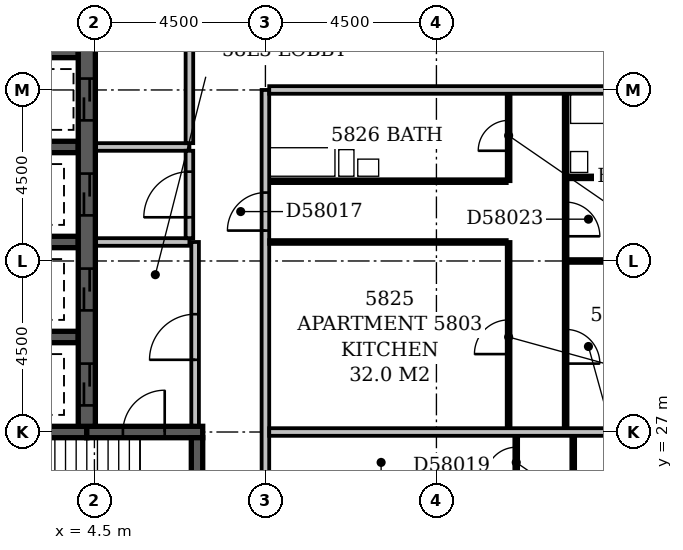
"""IFC4 building model, lengths in metres.
Left out: names, types, materials, properties, quantities, classifications, styles, units other than length and angle.
Written with IfcOpenShell. Run it as: python <this file> out.ifc"""

import sys

from ifc_helpers import new_model, si_unit, direction, frame, frame_2d, origin, place, context, subcontext, project, spatial, rectangle, extrude, element, fill, save


model = new_model("IFC4")
c1 = context("Model", 3, precision=1e-05, world=origin(), true_north=direction((0.0, 1.0)))
c2 = subcontext(c1, "Body", "Model", "MODEL_VIEW")
j1 = project(units=[si_unit("LENGTHUNIT", "METRE"), si_unit("PLANEANGLEUNIT", "RADIAN")], contexts=[c1])
p1 = place(None, origin())
s1 = spatial("IfcSite", under=j1, at=p1, CompositionType="ELEMENT")
p2 = place(p1, origin())
s2 = spatial("IfcBuilding", under=s1, at=p2, CompositionType="ELEMENT")
p3 = place(p2, frame((0.0, 0.0, 225.8)))
s3 = spatial("IfcBuildingStorey", under=s2, at=p3, CompositionType="ELEMENT", Elevation=225.8)
p4 = place(p3, frame((0.35, 27.0, -0.3), z_axis=(0.0, 0.0, 1.0), x_axis=(1.0, 0.0, 0.0)))
e1 = element("IfcWall", 1, at=p4, inside=s3, PredefinedType="SHEAR", context=c2, shape_type="SweptSolid", body=[
    extrude(rectangle(XDim=3.95, YDim=0.3, at=frame_2d((1.975, 0.0))), origin(), (0.0, 0.0, 1.0), 3.6),
])
for number, where, z_axis, x_axis in (
    (2, (0.725, 29.5, -0.3), (0.0, 0.0, 1.0), (1.0, 0.0, 0.0)),
    (3, (0.725, 32.0, -0.3), (0.0, 0.0, 1.0), (1.0, 0.0, 0.0)),
    (4, (0.725, 34.5, -0.3), (0.0, 0.0, 1.0), (1.0, 0.0, 0.0)),
    (5, (0.725, 37.0, -0.3), (0.0, 0.0, 1.0), (1.0, 0.0, 0.0)),
):
    element("IfcWall", number, at=place(p3, frame(where, z_axis=z_axis, x_axis=x_axis)), inside=s3, PredefinedType="SHEAR", context=c2, shape_type="SweptSolid", body=[
        extrude(rectangle(XDim=3.35, YDim=0.3, at=frame_2d((1.675, 0.0))), origin(), (0.0, 0.0, 1.0), 3.6),
    ])
p5 = place(p3, frame((4.3, 27.0, -0.3), z_axis=(0.0, 0.0, 1.0), x_axis=(1.0, 0.0, 0.0)))
e6 = element("IfcWall", 6, at=p5, inside=s3, PredefinedType="SHEAR", context=c2, shape_type="SweptSolid", body=[
    extrude(rectangle(XDim=3.05, YDim=0.3, at=frame_2d((1.525, 0.0))), origin(), (0.0, 0.0, 1.0), 3.6),
])
p6 = place(p5, frame((0.95, 0.0, 0.3)))
e7 = element("IfcOpeningElement", 7, at=p6, cuts=e6, PredefinedType="OPENING", context=c2, shape_type="SweptSolid", body=[
    extrude(rectangle(XDim=1.1, YDim=2.1, at=frame_2d((0.55, 1.05))), frame((0.0, 0.162, 0.0), z_axis=(0.0, -1.0, 0.0), x_axis=(1.0, 0.0, 0.0)), (0.0, 0.0, 1.0), 0.324),
])
p7 = place(p3, frame((4.3, 27.15, -0.3), z_axis=(0.0, 0.0, 1.0), x_axis=(0.0, 1.0, 0.0)))
e8 = element("IfcWall", 8, at=p7, inside=s3, PredefinedType="SHEAR", context=c2, shape_type="SweptSolid", body=[
    extrude(rectangle(XDim=22.125, YDim=0.45, at=frame_2d((11.062, 0.0))), origin(), (0.0, 0.0, 1.0), 3.6),
])
p8 = place(p7, frame((3.05, 0.0, 0.3)))
e9 = element("IfcOpeningElement", 9, at=p8, cuts=e8, PredefinedType="OPENING", context=c2, shape_type="SweptSolid", body=[
    extrude(rectangle(XDim=1.1, YDim=2.1, at=frame_2d((0.55, 1.05))), frame((0.0, 0.237, 0.0), z_axis=(0.0, -1.0, 0.0), x_axis=(1.0, 0.0, 0.0)), (0.0, 0.0, 1.0), 0.474),
])
p9 = place(p7, frame((0.55, 0.0, 0.3)))
e10 = element("IfcOpeningElement", 10, at=p9, cuts=e8, PredefinedType="OPENING", context=c2, shape_type="SweptSolid", body=[
    extrude(rectangle(XDim=1.1, YDim=2.1, at=frame_2d((0.55, 1.05))), frame((0.0, 0.237, 0.0), z_axis=(0.0, -1.0, 0.0), x_axis=(1.0, 0.0, 0.0)), (0.0, 0.0, 1.0), 0.474),
])
p10 = place(p7, frame((20.55, 0.0, 0.3)))
e11 = element("IfcOpeningElement", 11, at=p10, cuts=e8, PredefinedType="OPENING", context=c2, shape_type="SweptSolid", body=[
    extrude(rectangle(XDim=1.1, YDim=2.1, at=frame_2d((0.55, 1.05))), frame((0.0, 0.237, 0.0), z_axis=(0.0, -1.0, 0.0), x_axis=(1.0, 0.0, 0.0)), (0.0, 0.0, 1.0), 0.474),
])
p11 = place(p7, frame((18.05, 0.0, 0.3)))
e12 = element("IfcOpeningElement", 12, at=p11, cuts=e8, PredefinedType="OPENING", context=c2, shape_type="SweptSolid", body=[
    extrude(rectangle(XDim=1.1, YDim=2.1, at=frame_2d((0.55, 1.05))), frame((0.0, 0.237, 0.0), z_axis=(0.0, -1.0, 0.0), x_axis=(1.0, 0.0, 0.0)), (0.0, 0.0, 1.0), 0.474),
])
p12 = place(p7, frame((15.55, 0.0, 0.3)))
e13 = element("IfcOpeningElement", 13, at=p12, cuts=e8, PredefinedType="OPENING", context=c2, shape_type="SweptSolid", body=[
    extrude(rectangle(XDim=1.1, YDim=2.1, at=frame_2d((0.55, 1.05))), frame((0.0, 0.237, 0.0), z_axis=(0.0, -1.0, 0.0), x_axis=(1.0, 0.0, 0.0)), (0.0, 0.0, 1.0), 0.474),
])
p13 = place(p7, frame((13.05, 0.0, 0.3)))
e14 = element("IfcOpeningElement", 14, at=p13, cuts=e8, PredefinedType="OPENING", context=c2, shape_type="SweptSolid", body=[
    extrude(rectangle(XDim=1.1, YDim=2.1, at=frame_2d((0.55, 1.05))), frame((0.0, 0.237, 0.0), z_axis=(0.0, -1.0, 0.0), x_axis=(1.0, 0.0, 0.0)), (0.0, 0.0, 1.0), 0.474),
])
p14 = place(p7, frame((10.55, 0.0, 0.3)))
e15 = element("IfcOpeningElement", 15, at=p14, cuts=e8, PredefinedType="OPENING", context=c2, shape_type="SweptSolid", body=[
    extrude(rectangle(XDim=1.1, YDim=2.1, at=frame_2d((0.55, 1.05))), frame((0.0, 0.237, 0.0), z_axis=(0.0, -1.0, 0.0), x_axis=(1.0, 0.0, 0.0)), (0.0, 0.0, 1.0), 0.474),
])
p15 = place(p7, frame((8.05, 0.0, 0.3)))
e16 = element("IfcOpeningElement", 16, at=p15, cuts=e8, PredefinedType="OPENING", context=c2, shape_type="SweptSolid", body=[
    extrude(rectangle(XDim=1.1, YDim=2.1, at=frame_2d((0.55, 1.05))), frame((0.0, 0.237, 0.0), z_axis=(0.0, -1.0, 0.0), x_axis=(1.0, 0.0, 0.0)), (0.0, 0.0, 1.0), 0.474),
])
p16 = place(p7, frame((5.55, 0.0, 0.3)))
e17 = element("IfcOpeningElement", 17, at=p16, cuts=e8, PredefinedType="OPENING", context=c2, shape_type="SweptSolid", body=[
    extrude(rectangle(XDim=1.1, YDim=2.1, at=frame_2d((0.55, 1.05))), frame((0.0, 0.237, 0.0), z_axis=(0.0, -1.0, 0.0), x_axis=(1.0, 0.0, 0.0)), (0.0, 0.0, 1.0), 0.474),
])
p17 = place(p3, frame((7.2, 22.65, -0.3), z_axis=(0.0, 0.0, 1.0), x_axis=(0.0, 1.0, 0.0)))
e18 = element("IfcWall", 18, at=p17, inside=s3, PredefinedType="SHEAR", context=c2, shape_type="SweptSolid", body=[
    extrude(rectangle(XDim=4.2, YDim=0.3, at=frame_2d((2.1, 0.0))), origin(), (0.0, 0.0, 1.0), 3.6),
])
p18 = place(p17, frame((0.8, 0.0, 0.3)))
e19 = element("IfcOpeningElement", 19, at=p18, cuts=e18, PredefinedType="OPENING", context=c2, shape_type="SweptSolid", body=[
    extrude(rectangle(XDim=1.1, YDim=2.1, at=frame_2d((0.55, 1.05))), frame((0.0, 0.162, 0.0), z_axis=(0.0, -1.0, 0.0), x_axis=(1.0, 0.0, 0.0)), (0.0, 0.0, 1.0), 0.324),
])
p19 = place(p3, frame((4.545, 34.5, 0.0), z_axis=(0.0, 0.0, 1.0), x_axis=(1.0, 0.0, 0.0)))
e20 = element("IfcWall", 20, at=p19, inside=s3, PredefinedType="PARTITIONING", context=c2, shape_type="SweptSolid", body=[
    extrude(rectangle(XDim=2.455, YDim=0.2, at=frame_2d((1.228, 0.0))), origin(), (0.0, 0.0, 1.0), 3.3),
])
p20 = place(p3, frame((7.0, 34.6, 0.0), z_axis=(0.0, 0.0, 1.0), x_axis=(0.0, 1.0, 0.0)))
e21 = element("IfcWall", 21, at=p20, inside=s3, PredefinedType="PARTITIONING", context=c2, shape_type="SweptSolid", body=[
    extrude(rectangle(XDim=14.9, YDim=0.2, at=frame_2d((7.45, 0.0))), origin(), (0.0, 0.0, 1.0), 3.3),
])
p21 = place(p20, frame((2.8, 0.0, 0.0)))
e22 = element("IfcOpeningElement", 22, at=p21, cuts=e21, PredefinedType="OPENING", context=c2, shape_type="SweptSolid", body=[
    extrude(rectangle(XDim=1.2, YDim=2.1, at=frame_2d((0.6, 1.05))), frame((0.0, 0.112, 0.0), z_axis=(0.0, -1.0, 0.0), x_axis=(1.0, 0.0, 0.0)), (0.0, 0.0, 1.0), 0.224),
])
p22 = place(p20, frame((9.8, 0.0, 0.0)))
e23 = element("IfcOpeningElement", 23, at=p22, cuts=e21, PredefinedType="OPENING", context=c2, shape_type="SweptSolid", body=[
    extrude(rectangle(XDim=1.2, YDim=2.1, at=frame_2d((0.6, 1.05))), frame((0.0, 0.112, 0.0), z_axis=(0.0, -1.0, 0.0), x_axis=(1.0, 0.0, 0.0)), (0.0, 0.0, 1.0), 0.224),
])
p23 = place(p3, frame((4.545, 32.0, 0.0), z_axis=(0.0, 0.0, 1.0), x_axis=(1.0, 0.0, 0.0)))
e24 = element("IfcWall", 24, at=p23, inside=s3, PredefinedType="PARTITIONING", context=c2, shape_type="SweptSolid", body=[
    extrude(rectangle(XDim=2.455, YDim=0.2, at=frame_2d((1.228, 0.0))), origin(), (0.0, 0.0, 1.0), 3.3),
])
p24 = place(p3, frame((7.0, 32.1, 0.0), z_axis=(0.0, 0.0, 1.0), x_axis=(0.0, 1.0, 0.0)))
e25 = element("IfcWall", 25, at=p24, inside=s3, PredefinedType="PARTITIONING", context=c2, shape_type="SweptSolid", body=[
    extrude(rectangle(XDim=2.3, YDim=0.2, at=frame_2d((1.15, 0.0))), origin(), (0.0, 0.0, 1.0), 3.3),
])
p25 = place(p24, frame((0.55, 0.0, 0.0)))
e26 = element("IfcOpeningElement", 26, at=p25, cuts=e25, PredefinedType="OPENING", context=c2, shape_type="SweptSolid", body=[
    extrude(rectangle(XDim=1.2, YDim=2.1, at=frame_2d((0.6, 1.05))), frame((0.0, 0.112, 0.0), z_axis=(0.0, -1.0, 0.0), x_axis=(1.0, 0.0, 0.0)), (0.0, 0.0, 1.0), 0.224),
])
p26 = place(p3, frame((7.15, 27.17, 0.0), z_axis=(0.0, 0.0, 1.0), x_axis=(0.0, 1.0, 0.0)))
e27 = element("IfcWall", 27, at=p26, inside=s3, PredefinedType="PARTITIONING", context=c2, shape_type="SweptSolid", body=[
    extrude(rectangle(XDim=4.83, YDim=0.2, at=frame_2d((2.415, 0.0))), origin(), (0.0, 0.0, 1.0), 3.3),
])
p27 = place(p26, frame((1.73, 0.0, 0.0)))
e28 = element("IfcOpeningElement", 28, at=p27, cuts=e27, PredefinedType="OPENING", context=c2, shape_type="SweptSolid", body=[
    extrude(rectangle(XDim=1.2, YDim=2.1, at=frame_2d((0.6, 1.05))), frame((0.0, 0.112, 0.0), z_axis=(0.0, -1.0, 0.0), x_axis=(1.0, 0.0, 0.0)), (0.0, 0.0, 1.0), 0.224),
])
p28 = place(p3, frame((17.1, 17.4, 0.0), z_axis=(0.0, 0.0, 1.0), x_axis=(0.0, 1.0, 0.0)))
e29 = element("IfcWall", 29, at=p28, inside=s3, PredefinedType="PARTITIONING", context=c2, shape_type="SweptSolid", body=[
    extrude(rectangle(XDim=9.5, YDim=0.1, at=frame_2d((4.75, 0.0))), origin(), (0.0, 0.0, 1.0), 3.3),
])
p29 = place(p28, frame((2.4, 0.0, 0.0)))
e30 = element("IfcOpeningElement", 30, at=p29, cuts=e29, PredefinedType="OPENING", context=c2, shape_type="SweptSolid", body=[
    extrude(rectangle(XDim=0.9, YDim=2.1, at=frame_2d((0.45, 1.05))), frame((0.0, 0.062, 0.0), z_axis=(0.0, -1.0, 0.0), x_axis=(1.0, 0.0, 0.0)), (0.0, 0.0, 1.0), 0.124),
])
p30 = place(p28, frame((6.9, 0.0, 0.0)))
e31 = element("IfcOpeningElement", 31, at=p30, cuts=e29, PredefinedType="OPENING", context=c2, shape_type="SweptSolid", body=[
    extrude(rectangle(XDim=0.9, YDim=2.1, at=frame_2d((0.45, 1.05))), frame((0.0, 0.062, 0.0), z_axis=(0.0, -1.0, 0.0), x_axis=(1.0, 0.0, 0.0)), (0.0, 0.0, 1.0), 0.124),
])
p31 = place(p3, frame((9.0, 18.45, 0.0), z_axis=(0.0, 0.0, 1.0), x_axis=(0.0, 1.0, 0.0)))
e32 = element("IfcWall", 32, at=p31, inside=s3, PredefinedType="PARTITIONING", context=c2, shape_type="SweptSolid", body=[
    extrude(rectangle(XDim=17.55, YDim=0.2, at=frame_2d((8.775, 0.0))), origin(), (0.0, 0.0, 1.0), 3.3),
])
p32 = place(p31, frame((13.85, 0.0, 0.0)))
e33 = element("IfcOpeningElement", 33, at=p32, cuts=e32, PredefinedType="OPENING", context=c2, shape_type="SweptSolid", body=[
    extrude(rectangle(XDim=1.0, YDim=2.1, at=frame_2d((0.5, 1.05))), frame((0.0, 0.112, 0.0), z_axis=(0.0, -1.0, 0.0), x_axis=(1.0, 0.0, 0.0)), (0.0, 0.0, 1.0), 0.224),
])
p33 = place(p31, frame((3.25, 0.0, 0.0)))
e34 = element("IfcOpeningElement", 34, at=p33, cuts=e32, PredefinedType="OPENING", context=c2, shape_type="SweptSolid", body=[
    extrude(rectangle(XDim=1.0, YDim=2.1, at=frame_2d((0.5, 1.05))), frame((0.0, 0.112, 0.0), z_axis=(0.0, -1.0, 0.0), x_axis=(1.0, 0.0, 0.0)), (0.0, 0.0, 1.0), 0.224),
])
p34 = place(p3, frame((15.6, 23.0, 0.0), z_axis=(0.0, 0.0, 1.0), x_axis=(0.0, 1.0, 0.0)))
e35 = element("IfcWall", 35, at=p34, inside=s3, PredefinedType="PARTITIONING", context=c2, shape_type="SweptSolid", body=[
    extrude(rectangle(XDim=3.9, YDim=0.1, at=frame_2d((1.95, 0.0))), origin(), (0.0, 0.0, 1.0), 3.3),
])
p35 = place(p34, frame((0.8, 0.0, 0.0)))
e36 = element("IfcOpeningElement", 36, at=p35, cuts=e35, PredefinedType="OPENING", context=c2, shape_type="SweptSolid", body=[
    extrude(rectangle(XDim=0.8, YDim=2.1, at=frame_2d((0.4, 1.05))), frame((0.0, 0.062, 0.0), z_axis=(0.0, -1.0, 0.0), x_axis=(1.0, 0.0, 0.0)), (0.0, 0.0, 1.0), 0.124),
])
p36 = place(p34, frame((2.8, 0.0, 0.0)))
e37 = element("IfcOpeningElement", 37, at=p36, cuts=e35, PredefinedType="OPENING", context=c2, shape_type="SweptSolid", body=[
    extrude(rectangle(XDim=0.8, YDim=2.1, at=frame_2d((0.4, 1.05))), frame((0.0, 0.062, 0.0), z_axis=(0.0, -1.0, 0.0), x_axis=(1.0, 0.0, 0.0)), (0.0, 0.0, 1.0), 0.124),
])
p37 = place(p3, frame((9.1, 27.0, 0.0), z_axis=(0.0, 0.0, 1.0), x_axis=(1.0, 0.0, 0.0)))
e38 = element("IfcWall", 38, at=p37, inside=s3, PredefinedType="PARTITIONING", context=c2, shape_type="SweptSolid", body=[
    extrude(rectangle(XDim=12.95, YDim=0.2, at=frame_2d((6.475, 0.0))), origin(), (0.0, 0.0, 1.0), 2.7),
])
p38 = place(p3, frame((15.4, 27.1, 0.0), z_axis=(0.0, 0.0, 1.0), x_axis=(0.0, 1.0, 0.0)))
e39 = element("IfcWall", 39, at=p38, inside=s3, PredefinedType="PARTITIONING", context=c2, shape_type="SweptSolid", body=[
    extrude(rectangle(XDim=4.9, YDim=0.1, at=frame_2d((2.45, 0.0))), origin(), (0.0, 0.0, 1.0), 3.3),
])
p39 = place(p38, frame((1.95, 0.0, 0.0)))
e40 = element("IfcOpeningElement", 40, at=p39, cuts=e39, PredefinedType="OPENING", context=c2, shape_type="SweptSolid", body=[
    extrude(rectangle(XDim=0.9, YDim=2.1, at=frame_2d((0.45, 1.05))), frame((0.0, 0.062, 0.0), z_axis=(0.0, -1.0, 0.0), x_axis=(1.0, 0.0, 0.0)), (0.0, 0.0, 1.0), 0.124),
])
p40 = place(p3, frame((16.9, 27.1, 0.0), z_axis=(0.0, 0.0, 1.0), x_axis=(0.0, 1.0, 0.0)))
e41 = element("IfcWall", 41, at=p40, inside=s3, PredefinedType="PARTITIONING", context=c2, shape_type="SweptSolid", body=[
    extrude(rectangle(XDim=8.8, YDim=0.1, at=frame_2d((4.4, 0.0))), origin(), (0.0, 0.0, 1.0), 3.3),
])
p41 = place(p40, frame((1.7, 0.0, 0.0)))
e42 = element("IfcOpeningElement", 42, at=p41, cuts=e41, PredefinedType="OPENING", context=c2, shape_type="SweptSolid", body=[
    extrude(rectangle(XDim=0.9, YDim=2.1, at=frame_2d((0.45, 1.05))), frame((0.0, 0.062, 0.0), z_axis=(0.0, -1.0, 0.0), x_axis=(1.0, 0.0, 0.0)), (0.0, 0.0, 1.0), 0.124),
])
p42 = place(p40, frame((5.05, 0.0, 0.0)))
e43 = element("IfcOpeningElement", 43, at=p42, cuts=e41, PredefinedType="OPENING", context=c2, shape_type="SweptSolid", body=[
    extrude(rectangle(XDim=0.9, YDim=2.1, at=frame_2d((0.45, 1.05))), frame((0.0, 0.062, 0.0), z_axis=(0.0, -1.0, 0.0), x_axis=(1.0, 0.0, 0.0)), (0.0, 0.0, 1.0), 0.124),
])
p43 = place(p3, frame((16.95, 31.5, 0.0), z_axis=(0.0, 0.0, 1.0), x_axis=(1.0, 0.0, 0.0)))
e44 = element("IfcWall", 44, at=p43, inside=s3, PredefinedType="PARTITIONING", context=c2, shape_type="SweptSolid", body=[
    extrude(rectangle(XDim=5.1, YDim=0.1, at=frame_2d((2.55, 0.0))), origin(), (0.0, 0.0, 1.0), 3.3),
])
p44 = place(p3, frame((9.1, 32.0, 0.0), z_axis=(0.0, 0.0, 1.0), x_axis=(1.0, 0.0, 0.0)))
e45 = element("IfcWall", 45, at=p44, inside=s3, PredefinedType="PARTITIONING", context=c2, shape_type="SweptSolid", body=[
    extrude(rectangle(XDim=6.25, YDim=0.1, at=frame_2d((3.125, 0.0))), origin(), (0.0, 0.0, 1.0), 3.3),
])
p45 = place(p3, frame((9.1, 33.6, 0.0), z_axis=(0.0, 0.0, 1.0), x_axis=(1.0, 0.0, 0.0)))
e46 = element("IfcWall", 46, at=p45, inside=s3, PredefinedType="PLUMBINGWALL", context=c2, shape_type="SweptSolid", body=[
    extrude(rectangle(XDim=6.25, YDim=0.1, at=frame_2d((3.125, 0.0))), origin(), (0.0, 0.0, 1.0), 3.3),
])
p46 = place(p3, frame((15.4, 33.6, 0.0), z_axis=(0.0, 0.0, 1.0), x_axis=(0.0, 1.0, 0.0)))
e47 = element("IfcWall", 47, at=p46, inside=s3, PredefinedType="PARTITIONING", context=c2, shape_type="SweptSolid", body=[
    extrude(rectangle(XDim=2.3, YDim=0.1, at=frame_2d((1.15, 0.0))), origin(), (0.0, 0.0, 1.0), 3.3),
])
p47 = place(p46, frame((0.8, 0.0, 0.0)))
e48 = element("IfcOpeningElement", 48, at=p47, cuts=e47, PredefinedType="OPENING", context=c2, shape_type="SweptSolid", body=[
    extrude(rectangle(XDim=0.8, YDim=2.1, at=frame_2d((0.4, 1.05))), frame((0.0, 0.062, 0.0), z_axis=(0.0, -1.0, 0.0), x_axis=(1.0, 0.0, 0.0)), (0.0, 0.0, 1.0), 0.124),
])
p48 = place(p3, frame((16.95, 33.7, 0.0), z_axis=(0.0, 0.0, 1.0), x_axis=(1.0, 0.0, 0.0)))
e49 = element("IfcWall", 49, at=p48, inside=s3, PredefinedType="PLUMBINGWALL", context=c2, shape_type="SweptSolid", body=[
    extrude(rectangle(XDim=2.8, YDim=0.1, at=frame_2d((1.4, 0.0))), origin(), (0.0, 0.0, 1.0), 3.3),
])
p49 = place(p48, frame((1.0, 0.0, 0.0)))
e50 = element("IfcOpeningElement", 50, at=p49, cuts=e49, PredefinedType="OPENING", context=c2, shape_type="SweptSolid", body=[
    extrude(rectangle(XDim=0.8, YDim=2.1, at=frame_2d((0.4, 1.05))), frame((0.0, 0.062, 0.0), z_axis=(0.0, -1.0, 0.0), x_axis=(1.0, 0.0, 0.0)), (0.0, 0.0, 1.0), 0.124),
])
p50 = place(p3, frame((9.1, 36.0, 0.0), z_axis=(0.0, 0.0, 1.0), x_axis=(1.0, 0.0, 0.0)))
e51 = element("IfcWall", 51, at=p50, inside=s3, PredefinedType="PARTITIONING", context=c2, shape_type="SweptSolid", body=[
    extrude(rectangle(XDim=12.95, YDim=0.2, at=frame_2d((6.475, 0.0))), origin(), (0.0, 0.0, 1.0), 3.3),
])
p51 = place(p27, origin())
e52 = element("IfcDoor", 52, at=p51, inside=s3, OperationType="SINGLE_SWING_LEFT", PredefinedType="DOOR", context=c2, shape_type="SweptSolid", body=[
    extrude(rectangle(XDim=1.2, YDim=2.1, at=frame_2d((0.6, 1.05))), frame((0.0, 0.025, 0.0), z_axis=(0.0, -1.0, 0.0), x_axis=(1.0, 0.0, 0.0)), (0.0, 0.0, 1.0), 0.05),
])
fill(e28, e52)
p52 = place(p8, origin())
e53 = element("IfcDoor", 53, at=p52, inside=s3, OperationType="SLIDING_TO_LEFT", PredefinedType="DOOR", context=c2, shape_type="SweptSolid", body=[
    extrude(rectangle(XDim=1.1, YDim=2.1, at=frame_2d((0.55, 1.05))), frame((0.0, 0.025, 0.0), z_axis=(0.0, -1.0, 0.0), x_axis=(1.0, 0.0, 0.0)), (0.0, 0.0, 1.0), 0.05),
])
fill(e9, e53)
p53 = place(p9, origin())
e54 = element("IfcDoor", 54, at=p53, inside=s3, OperationType="SLIDING_TO_LEFT", PredefinedType="DOOR", context=c2, shape_type="SweptSolid", body=[
    extrude(rectangle(XDim=1.1, YDim=2.1, at=frame_2d((0.55, 1.05))), frame((0.0, 0.025, 0.0), z_axis=(0.0, -1.0, 0.0), x_axis=(1.0, 0.0, 0.0)), (0.0, 0.0, 1.0), 0.05),
])
fill(e10, e54)
p54 = place(p15, origin())
e55 = element("IfcDoor", 55, at=p54, inside=s3, OperationType="SLIDING_TO_LEFT", PredefinedType="DOOR", context=c2, shape_type="SweptSolid", body=[
    extrude(rectangle(XDim=1.1, YDim=2.1, at=frame_2d((0.55, 1.05))), frame((0.0, 0.025, 0.0), z_axis=(0.0, -1.0, 0.0), x_axis=(1.0, 0.0, 0.0)), (0.0, 0.0, 1.0), 0.05),
])
fill(e16, e55)
p55 = place(p25, origin())
e56 = element("IfcDoor", 56, at=p55, inside=s3, OperationType="SINGLE_SWING_LEFT", PredefinedType="DOOR", context=c2, shape_type="SweptSolid", body=[
    extrude(rectangle(XDim=1.2, YDim=2.1, at=frame_2d((0.6, 1.05))), frame((0.0, 0.025, 0.0), z_axis=(0.0, -1.0, 0.0), x_axis=(1.0, 0.0, 0.0)), (0.0, 0.0, 1.0), 0.05),
])
fill(e26, e56)
p56 = place(p16, origin())
e57 = element("IfcDoor", 57, at=p56, inside=s3, OperationType="SLIDING_TO_LEFT", PredefinedType="DOOR", context=c2, shape_type="SweptSolid", body=[
    extrude(rectangle(XDim=1.1, YDim=2.1, at=frame_2d((0.55, 1.05))), frame((0.0, 0.025, 0.0), z_axis=(0.0, -1.0, 0.0), x_axis=(1.0, 0.0, 0.0)), (0.0, 0.0, 1.0), 0.05),
])
fill(e17, e57)
p57 = place(p6, frame((1.1, 0.0, 0.0), z_axis=(0.0, 0.0, 1.0), x_axis=(-1.0, 0.0, 0.0)))
e58 = element("IfcDoor", 58, at=p57, inside=s3, OperationType="SINGLE_SWING_LEFT", PredefinedType="DOOR", context=c2, shape_type="SweptSolid", body=[
    extrude(rectangle(XDim=1.1, YDim=2.1, at=frame_2d((0.55, 1.05))), frame((0.0, 0.025, 0.0), z_axis=(0.0, -1.0, 0.0), x_axis=(1.0, 0.0, 0.0)), (0.0, 0.0, 1.0), 0.05),
])
fill(e7, e58)
p58 = place(p32, origin())
e59 = element("IfcDoor", 59, at=p58, inside=s3, OperationType="SINGLE_SWING_LEFT", PredefinedType="DOOR", context=c2, shape_type="SweptSolid", body=[
    extrude(rectangle(XDim=1.0, YDim=2.1, at=frame_2d((0.5, 1.05))), frame((0.0, 0.025, 0.0), z_axis=(0.0, -1.0, 0.0), x_axis=(1.0, 0.0, 0.0)), (0.0, 0.0, 1.0), 0.05),
])
fill(e33, e59)
p59 = place(p36, origin())
e60 = element("IfcDoor", 60, at=p59, inside=s3, OperationType="SINGLE_SWING_LEFT", PredefinedType="DOOR", context=c2, shape_type="SweptSolid", body=[
    extrude(rectangle(XDim=0.8, YDim=2.1, at=frame_2d((0.4, 1.05))), frame((0.0, 0.025, 0.0), z_axis=(0.0, -1.0, 0.0), x_axis=(1.0, 0.0, 0.0)), (0.0, 0.0, 1.0), 0.05),
])
fill(e37, e60)
p60 = place(p39, origin())
e61 = element("IfcDoor", 61, at=p60, inside=s3, OperationType="SINGLE_SWING_LEFT", PredefinedType="DOOR", context=c2, shape_type="SweptSolid", body=[
    extrude(rectangle(XDim=0.9, YDim=2.1, at=frame_2d((0.45, 1.05))), frame((0.0, 0.025, 0.0), z_axis=(0.0, -1.0, 0.0), x_axis=(1.0, 0.0, 0.0)), (0.0, 0.0, 1.0), 0.05),
])
fill(e40, e61)
p61 = place(p41, frame((0.9, 0.0, 0.0), z_axis=(0.0, 0.0, 1.0), x_axis=(-1.0, 0.0, 0.0)))
e62 = element("IfcDoor", 62, at=p61, inside=s3, OperationType="SINGLE_SWING_RIGHT", PredefinedType="DOOR", context=c2, shape_type="SweptSolid", body=[
    extrude(rectangle(XDim=0.9, YDim=2.1, at=frame_2d((0.45, 1.05))), frame((0.0, 0.025, 0.0), z_axis=(0.0, -1.0, 0.0), x_axis=(1.0, 0.0, 0.0)), (0.0, 0.0, 1.0), 0.05),
])
fill(e42, e62)
p62 = place(p42, frame((0.9, 0.0, 0.0), z_axis=(0.0, 0.0, 1.0), x_axis=(-1.0, 0.0, 0.0)))
e63 = element("IfcDoor", 63, at=p62, inside=s3, OperationType="SINGLE_SWING_RIGHT", PredefinedType="DOOR", context=c2, shape_type="SweptSolid", body=[
    extrude(rectangle(XDim=0.9, YDim=2.1, at=frame_2d((0.45, 1.05))), frame((0.0, 0.025, 0.0), z_axis=(0.0, -1.0, 0.0), x_axis=(1.0, 0.0, 0.0)), (0.0, 0.0, 1.0), 0.05),
])
fill(e43, e63)
p63 = place(p47, origin())
e64 = element("IfcDoor", 64, at=p63, inside=s3, OperationType="SINGLE_SWING_LEFT", PredefinedType="DOOR", context=c2, shape_type="SweptSolid", body=[
    extrude(rectangle(XDim=0.8, YDim=2.1, at=frame_2d((0.4, 1.05))), frame((0.0, 0.025, 0.0), z_axis=(0.0, -1.0, 0.0), x_axis=(1.0, 0.0, 0.0)), (0.0, 0.0, 1.0), 0.05),
])
fill(e48, e64)
save(model, sys.argv[1])
